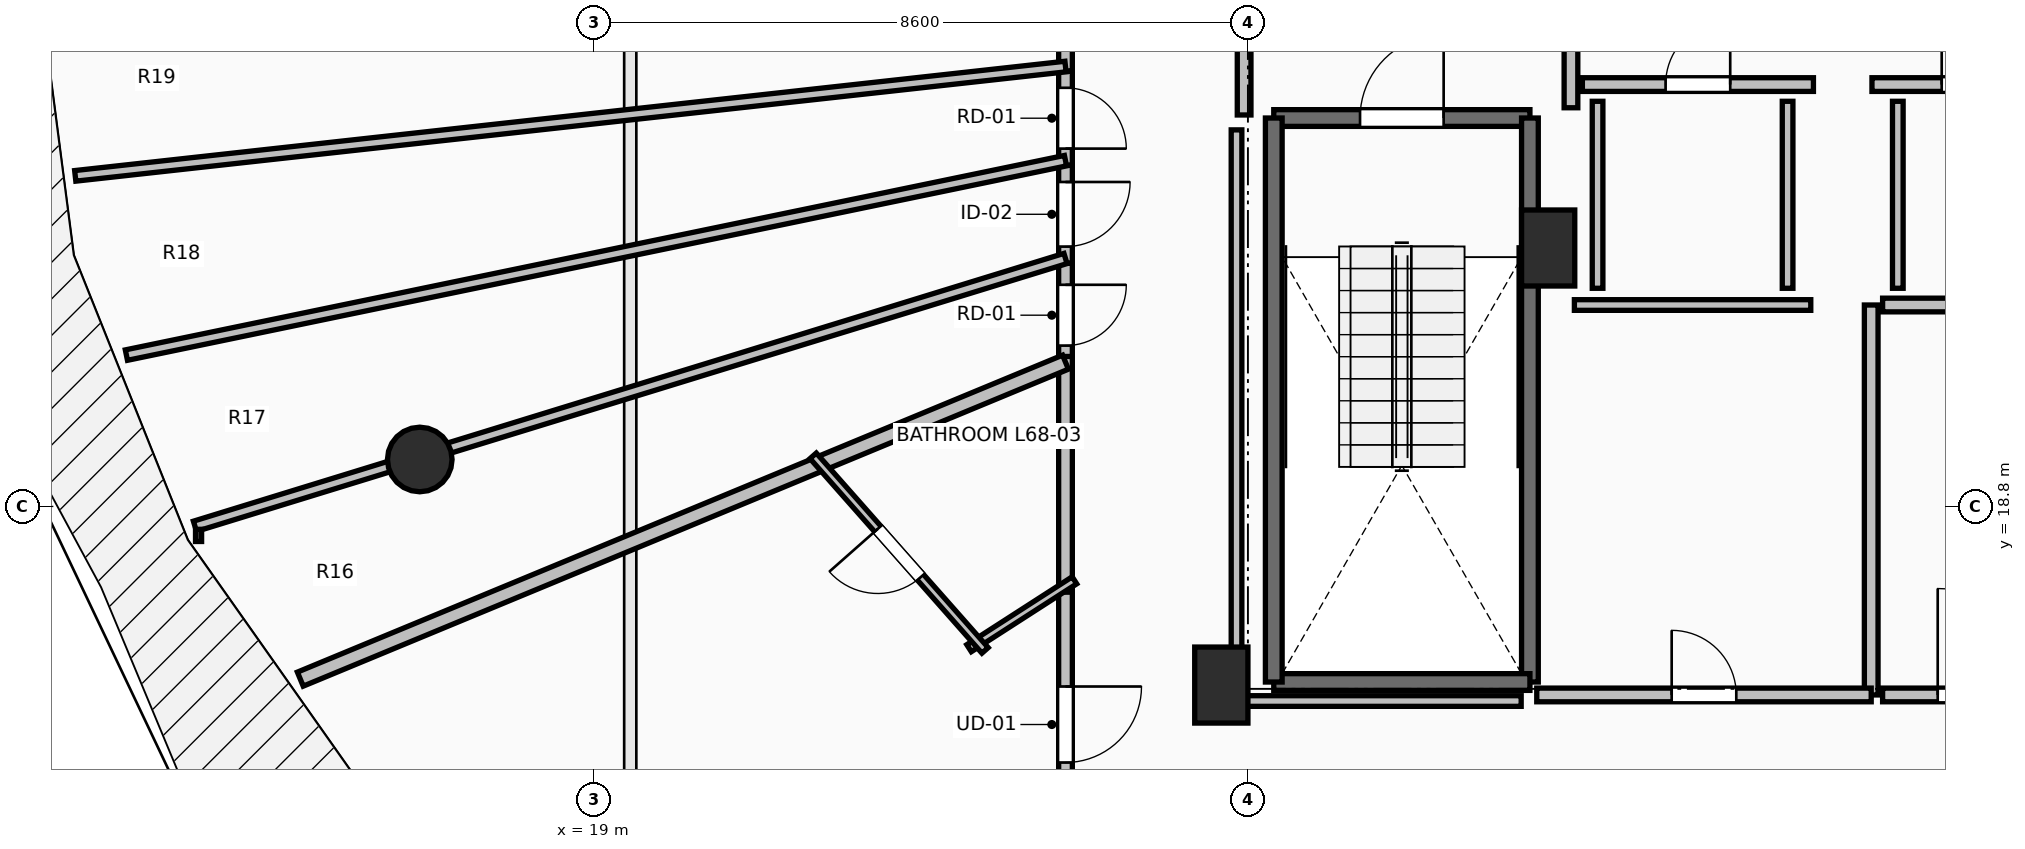
"""IFC4 building model, lengths in metres.
Left out: names, types, materials, properties, quantities, classifications, styles, units other than length and angle.
Written with IfcOpenShell. Run it as: python <this file> out.ifc"""

import sys

from ifc_helpers import new_model, si_unit, direction, frame, frame_2d, origin, origin_2d, place, context, subcontext, project, spatial, rectangle, circle, extrude, element, fill, save


model = new_model("IFC4")
c1 = context("Model", 3, precision=1e-05, world=origin(), true_north=direction((0.0, 1.0)))
c2 = subcontext(c1, "Body", "Model", "MODEL_VIEW")
j1 = project(units=[si_unit("LENGTHUNIT", "METRE"), si_unit("PLANEANGLEUNIT", "RADIAN")], contexts=[c1])
p1 = place(None, origin())
s1 = spatial("IfcSite", under=j1, at=p1, CompositionType="ELEMENT")
p2 = place(p1, origin())
s2 = spatial("IfcBuilding", under=s1, at=p2, CompositionType="ELEMENT")
p3 = place(p2, frame((0.0, 0.0, 252.0)))
s3 = spatial("IfcBuildingStorey", under=s2, at=p3, CompositionType="ELEMENT", Elevation=252.0)
p4 = place(p3, frame((16.705, 19.418, 0.0), z_axis=(0.0, 0.0, 1.0), x_axis=(-0.923879532511, -0.382683432365, 0.0)))
e1 = element("IfcColumn", 1, at=p4, inside=s3, PredefinedType="COLUMN", context=c2, shape_type="SweptSolid", body=[
    extrude(circle(Radius=0.425, at=origin_2d()), origin(), (0.0, 0.0, 1.0), 3.55),
])
for number, where, z_axis, x_axis in (
    (2, (27.25, 16.45, 0.0), (0.0, 0.0, 1.0), (1.0, 0.0, 0.0)),
    (3, (31.55, 22.2, 0.0), (0.0, 0.0, 1.0), (1.0, 0.0, 0.0)),
):
    element("IfcColumn", number, at=place(p3, frame(where, z_axis=z_axis, x_axis=x_axis)), inside=s3, PredefinedType="PILASTER", context=c2, shape_type="SweptSolid", body=[
        extrude(rectangle(XDim=0.7, YDim=1.0, at=origin_2d()), origin(), (0.0, 0.0, 1.0), 3.55),
    ])
p5 = place(p3, frame((27.94, 23.91, 0.0), z_axis=(0.0, 0.0, 1.0), x_axis=(1.0, 0.0, 0.0)))
e4 = element("IfcWall", 4, at=p5, inside=s3, PredefinedType="SOLIDWALL", context=c2, shape_type="SweptSolid", body=[
    extrude(rectangle(XDim=3.37, YDim=0.22, at=frame_2d((1.685, 0.0))), origin(), (0.0, 0.0, 1.0), 3.29),
])
p6 = place(p5, frame((1.135, 0.0, 0.0)))
e5 = element("IfcOpeningElement", 5, at=p6, cuts=e4, PredefinedType="OPENING", context=c2, shape_type="SweptSolid", body=[
    extrude(rectangle(XDim=1.1, YDim=2.15, at=frame_2d((0.55, 1.075))), frame((0.0, 0.125, 0.0), z_axis=(0.0, -1.0, 0.0), x_axis=(1.0, 0.0, 0.0)), (0.0, 0.0, 1.0), 0.25),
])
p7 = place(p3, frame((31.31, 23.91, 0.0), z_axis=(0.0, 0.0, 1.0), x_axis=(0.0, -1.0, 0.0)))
e6 = element("IfcWall", 6, at=p7, inside=s3, PredefinedType="SOLIDWALL", context=c2, shape_type="SweptSolid", body=[
    extrude(rectangle(XDim=7.42, YDim=0.22, at=frame_2d((3.71, 0.0))), origin(), (0.0, 0.0, 1.0), 3.29),
])
p8 = place(p3, frame((31.31, 16.49, 0.0), z_axis=(0.0, 0.0, 1.0), x_axis=(-1.0, 0.0, 0.0)))
e7 = element("IfcWall", 7, at=p8, inside=s3, PredefinedType="SOLIDWALL", context=c2, shape_type="SweptSolid", body=[
    extrude(rectangle(XDim=3.37, YDim=0.22, at=frame_2d((1.685, 0.0))), origin(), (0.0, 0.0, 1.0), 3.29),
])
p9 = place(p3, frame((27.94, 16.49, 0.0), z_axis=(0.0, 0.0, 1.0), x_axis=(0.0, 1.0, 0.0)))
e8 = element("IfcWall", 8, at=p9, inside=s3, PredefinedType="SOLIDWALL", context=c2, shape_type="SweptSolid", body=[
    extrude(rectangle(XDim=7.42, YDim=0.22, at=frame_2d((3.71, 0.0))), origin(), (0.0, 0.0, 1.0), 3.29),
])
p10 = place(p3, frame((31.85, 24.045, 0.0), z_axis=(0.0, 0.0, 1.0), x_axis=(0.0, 1.0, 0.0)))
e9 = element("IfcWall", 9, at=p10, inside=s3, PredefinedType="PARTITIONING", context=c2, shape_type="SweptSolid", body=[
    extrude(rectangle(XDim=3.91, YDim=0.18, at=frame_2d((1.955, 0.0))), origin(), (0.0, 0.0, 1.0), 3.29),
])
p11 = place(p10, frame((1.355, 0.0, 0.0)))
e10 = element("IfcOpeningElement", 10, at=p11, cuts=e9, PredefinedType="OPENING", context=c2, shape_type="SweptSolid", body=[
    extrude(rectangle(XDim=1.2, YDim=2.15, at=frame_2d((0.6, 1.075))), frame((0.0, 0.105, 0.0), z_axis=(0.0, -1.0, 0.0), x_axis=(1.0, 0.0, 0.0)), (0.0, 0.0, 1.0), 0.21),
])
p12 = place(p3, frame((27.55, 28.0, 0.0), z_axis=(0.0, 0.0, 1.0), x_axis=(0.0, -1.0, 0.0)))
e11 = element("IfcWall", 11, at=p12, inside=s3, PredefinedType="PARTITIONING", context=c2, shape_type="SweptSolid", body=[
    extrude(rectangle(XDim=4.05, YDim=0.18, at=frame_2d((2.025, 0.0))), origin(), (0.0, 0.0, 1.0), 3.29),
])
p13 = place(p12, frame((1.425, 0.0, 0.0)))
e12 = element("IfcOpeningElement", 12, at=p13, cuts=e11, PredefinedType="OPENING", context=c2, shape_type="SweptSolid", body=[
    extrude(rectangle(XDim=1.2, YDim=2.15, at=frame_2d((0.6, 1.075))), frame((0.0, 0.105, 0.0), z_axis=(0.0, -1.0, 0.0), x_axis=(1.0, 0.0, 0.0)), (0.0, 0.0, 1.0), 0.21),
])
p14 = place(p3, frame((32.0, 24.35, 0.0), z_axis=(0.0, 0.0, 1.0), x_axis=(1.0, 0.0, 0.0)))
e13 = element("IfcWall", 13, at=p14, inside=s3, PredefinedType="PARTITIONING", context=c2, shape_type="SweptSolid", body=[
    extrude(rectangle(XDim=3.04, YDim=0.18, at=frame_2d((1.52, 0.0))), origin(), (0.0, 0.0, 1.0), 3.29),
])
p15 = place(p14, frame((1.095, 0.0, 0.0)))
e14 = element("IfcOpeningElement", 14, at=p15, cuts=e13, PredefinedType="OPENING", context=c2, shape_type="SweptSolid", body=[
    extrude(rectangle(XDim=0.85, YDim=2.1, at=frame_2d((0.425, 1.05))), frame((0.0, 0.105, 0.0), z_axis=(0.0, -1.0, 0.0), x_axis=(1.0, 0.0, 0.0)), (0.0, 0.0, 1.0), 0.21),
])
p16 = place(p3, frame((35.81, 24.35, 0.0), z_axis=(0.0, 0.0, 1.0), x_axis=(1.0, 0.0, 0.0)))
e15 = element("IfcWall", 15, at=p16, inside=s3, PredefinedType="PARTITIONING", context=c2, shape_type="SweptSolid", body=[
    extrude(rectangle(XDim=2.835, YDim=0.18, at=frame_2d((1.417, 0.0))), origin(), (0.0, 0.0, 1.0), 3.29),
])
p17 = place(p16, frame((0.917, 0.0, 0.0)))
e16 = element("IfcOpeningElement", 16, at=p17, cuts=e15, PredefinedType="OPENING", context=c2, shape_type="SweptSolid", body=[
    extrude(rectangle(XDim=1.0, YDim=2.15, at=frame_2d((0.5, 1.075))), frame((0.0, 0.105, 0.0), z_axis=(0.0, -1.0, 0.0), x_axis=(1.0, 0.0, 0.0)), (0.0, 0.0, 1.0), 0.21),
])
p18 = place(p3, frame((35.8, 16.32, 0.0), z_axis=(0.0, 0.0, 1.0), x_axis=(0.0, 1.0, 0.0)))
e17 = element("IfcWall", 17, at=p18, inside=s3, PredefinedType="PARTITIONING", context=c2, shape_type="SweptSolid", body=[
    extrude(rectangle(XDim=5.13, YDim=0.18, at=frame_2d((2.565, 0.0))), origin(), (0.0, 0.0, 1.0), 3.29),
])
p19 = place(p3, frame((35.005, 21.45, 0.0), z_axis=(0.0, 0.0, 1.0), x_axis=(-1.0, 0.0, 0.0)))
e18 = element("IfcWall", 18, at=p19, inside=s3, PredefinedType="PARTITIONING", context=c2, shape_type="SweptSolid", body=[
    extrude(rectangle(XDim=3.11, YDim=0.14, at=frame_2d((1.555, 0.0))), origin(), (0.0, 0.0, 1.0), 3.29),
])
p20 = place(p3, frame((31.4, 16.32, 0.0), z_axis=(0.0, 0.0, 1.0), x_axis=(1.0, 0.0, 0.0)))
e19 = element("IfcWall", 19, at=p20, inside=s3, PredefinedType="PARTITIONING", context=c2, shape_type="SweptSolid", body=[
    extrude(rectangle(XDim=4.4, YDim=0.18, at=frame_2d((2.2, 0.0))), origin(), (0.0, 0.0, 1.0), 3.29),
])
p21 = place(p20, frame((1.775, 0.0, 0.0)))
e20 = element("IfcOpeningElement", 20, at=p21, cuts=e19, PredefinedType="OPENING", context=c2, shape_type="SweptSolid", body=[
    extrude(rectangle(XDim=0.85, YDim=2.1, at=frame_2d((0.425, 1.05))), frame((0.0, 0.105, 0.0), z_axis=(0.0, -1.0, 0.0), x_axis=(1.0, 0.0, 0.0)), (0.0, 0.0, 1.0), 0.21),
])
p22 = place(p3, frame((38.8, 21.45, 0.0), z_axis=(0.0, 0.0, 1.0), x_axis=(-1.0, 0.0, 0.0)))
e21 = element("IfcWall", 21, at=p22, inside=s3, PredefinedType="PARTITIONING", context=c2, shape_type="SweptSolid", body=[
    extrude(rectangle(XDim=2.85, YDim=0.18, at=frame_2d((1.425, 0.0))), origin(), (0.0, 0.0, 1.0), 3.29),
])
p23 = place(p3, frame((35.95, 16.32, 0.0), z_axis=(0.0, 0.0, 1.0), x_axis=(1.0, 0.0, 0.0)))
e22 = element("IfcWall", 22, at=p23, inside=s3, PredefinedType="PARTITIONING", context=c2, shape_type="SweptSolid", body=[
    extrude(rectangle(XDim=2.85, YDim=0.18, at=frame_2d((1.425, 0.0))), origin(), (0.0, 0.0, 1.0), 3.29),
])
p24 = place(p23, frame((0.725, 0.0, 0.0)))
e23 = element("IfcOpeningElement", 23, at=p24, cuts=e22, PredefinedType="OPENING", context=c2, shape_type="SweptSolid", body=[
    extrude(rectangle(XDim=1.4, YDim=2.2, at=frame_2d((0.7, 1.1))), frame((0.0, 0.105, 0.0), z_axis=(0.0, -1.0, 0.0), x_axis=(1.0, 0.0, 0.0)), (0.0, 0.0, 1.0), 0.21),
])
p25 = place(p3, frame((25.2, 25.739, 0.0), z_axis=(0.0, 0.0, 1.0), x_axis=(0.0, -1.0, 0.0)))
e24 = element("IfcWall", 24, at=p25, inside=s3, PredefinedType="PARTITIONING", context=c2, shape_type="SweptSolid", body=[
    extrude(rectangle(XDim=1.212, YDim=0.18, at=frame_2d((0.606, 0.0))), origin(), (0.0, 0.0, 1.0), 3.29),
])
p26 = place(p3, frame((25.2, 24.527, 0.0), z_axis=(0.0, 0.0, 1.0), x_axis=(0.0, -1.0, 0.0)))
e25 = element("IfcWall", 25, at=p26, inside=s3, PredefinedType="PARTITIONING", context=c2, shape_type="SweptSolid", body=[
    extrude(rectangle(XDim=1.239, YDim=0.18, at=frame_2d((0.62, 0.0))), origin(), (0.0, 0.0, 1.0), 3.29),
])
p27 = place(p26, frame((0.219, 0.0, 0.0)))
e26 = element("IfcOpeningElement", 26, at=p27, cuts=e25, PredefinedType="OPENING", context=c2, shape_type="SweptSolid", body=[
    extrude(rectangle(XDim=0.8, YDim=2.05, at=frame_2d((0.4, 1.025))), frame((0.0, 0.105, 0.0), z_axis=(0.0, -1.0, 0.0), x_axis=(1.0, 0.0, 0.0)), (0.0, 0.0, 1.0), 0.21),
])
p28 = place(p3, frame((25.2, 23.288, 0.0), z_axis=(0.0, 0.0, 1.0), x_axis=(0.0, -1.0, 0.0)))
e27 = element("IfcWall", 27, at=p28, inside=s3, PredefinedType="PARTITIONING", context=c2, shape_type="SweptSolid", body=[
    extrude(rectangle(XDim=1.289, YDim=0.18, at=frame_2d((0.645, 0.0))), origin(), (0.0, 0.0, 1.0), 3.29),
])
p29 = place(p28, frame((0.219, 0.0, 0.0)))
e28 = element("IfcOpeningElement", 28, at=p29, cuts=e27, PredefinedType="OPENING", context=c2, shape_type="SweptSolid", body=[
    extrude(rectangle(XDim=0.85, YDim=2.1, at=frame_2d((0.425, 1.05))), frame((0.0, 0.105, 0.0), z_axis=(0.0, -1.0, 0.0), x_axis=(1.0, 0.0, 0.0)), (0.0, 0.0, 1.0), 0.21),
])
p30 = place(p3, frame((25.2, 21.999, 0.0), z_axis=(0.0, 0.0, 1.0), x_axis=(0.0, -1.0, 0.0)))
e29 = element("IfcWall", 29, at=p30, inside=s3, PredefinedType="PARTITIONING", context=c2, shape_type="SweptSolid", body=[
    extrude(rectangle(XDim=1.366, YDim=0.18, at=frame_2d((0.683, 0.0))), origin(), (0.0, 0.0, 1.0), 3.29),
])
p31 = place(p30, frame((0.283, 0.0, 0.0)))
e30 = element("IfcOpeningElement", 30, at=p31, cuts=e29, PredefinedType="OPENING", context=c2, shape_type="SweptSolid", body=[
    extrude(rectangle(XDim=0.8, YDim=2.05, at=frame_2d((0.4, 1.025))), frame((0.0, 0.105, 0.0), z_axis=(0.0, -1.0, 0.0), x_axis=(1.0, 0.0, 0.0)), (0.0, 0.0, 1.0), 0.21),
])
p32 = place(p3, frame((25.2, 17.812, 0.0), z_axis=(0.0, 0.0, 1.0), x_axis=(0.0, -1.0, 0.0)))
e31 = element("IfcWall", 31, at=p32, inside=s3, PredefinedType="PARTITIONING", context=c2, shape_type="SweptSolid", body=[
    extrude(rectangle(XDim=3.762, YDim=0.18, at=frame_2d((1.881, 0.0))), origin(), (0.0, 0.0, 1.0), 2.482),
])
p33 = place(p32, frame((1.381, 0.0, 0.0)))
e32 = element("IfcOpeningElement", 32, at=p33, cuts=e31, PredefinedType="OPENING", context=c2, shape_type="SweptSolid", body=[
    extrude(rectangle(XDim=1.0, YDim=2.15, at=frame_2d((0.5, 1.075))), frame((0.0, 0.105, 0.0), z_axis=(0.0, -1.0, 0.0), x_axis=(1.0, 0.0, 0.0)), (0.0, 0.0, 1.0), 0.21),
])
p34 = place(p3, frame((25.2, 20.773, 0.0), z_axis=(0.0, 0.0, 1.0), x_axis=(0.0, -1.0, 0.0)))
e33 = element("IfcWall", 33, at=p34, inside=s3, PredefinedType="PARTITIONING", context=c2, shape_type="SweptSolid", body=[
    extrude(rectangle(XDim=3.101, YDim=0.18, at=frame_2d((1.55, 0.0))), origin(), (0.0, 0.0, 1.0), 3.29),
])
p35 = place(p3, frame((12.172, 23.149, 0.0), z_axis=(0.0, 0.0, 1.0), x_axis=(0.993963433103, 0.109711866515, 0.0)))
e34 = element("IfcWall", 34, at=p35, inside=s3, PredefinedType="PARTITIONING", context=c2, shape_type="SweptSolid", body=[
    extrude(rectangle(XDim=13.107, YDim=0.14, at=frame_2d((6.553, 0.0))), origin(), (0.0, 0.0, 1.0), 2.874),
])
p36 = place(p3, frame((12.845, 20.791, 0.0), z_axis=(0.0, 0.0, 1.0), x_axis=(0.97923049011, 0.202750208975, 0.0)))
e35 = element("IfcWall", 35, at=p36, inside=s3, PredefinedType="PARTITIONING", context=c2, shape_type="SweptSolid", body=[
    extrude(rectangle(XDim=12.617, YDim=0.14, at=frame_2d((6.309, 0.0))), origin(), (0.0, 0.0, 1.0), 2.874),
])
p37 = place(p3, frame((13.747, 18.539, 0.0), z_axis=(0.0, 0.0, 1.0), x_axis=(0.955802794564, 0.294008533725, 0.0)))
e36 = element("IfcWall", 36, at=p37, inside=s3, PredefinedType="PARTITIONING", context=c2, shape_type="SweptSolid", body=[
    extrude(rectangle(XDim=11.982, YDim=0.14, at=frame_2d((5.991, 0.0))), origin(), (0.0, 0.0, 1.0), 2.482),
])
p38 = place(p3, frame((15.133, 16.528, 0.0), z_axis=(0.0, 0.0, 1.0), x_axis=(0.923877013663, 0.382689513347, 0.0)))
e37 = element("IfcWall", 37, at=p38, inside=s3, PredefinedType="PARTITIONING", context=c2, shape_type="SweptSolid", body=[
    extrude(rectangle(XDim=10.896, YDim=0.2, at=frame_2d((5.448, 0.0))), origin(), (0.0, 0.0, 1.0), 2.482),
])
p39 = place(p3, frame((25.318, 17.828, 0.0), z_axis=(0.0, 0.0, 1.0), x_axis=(-0.840783734709, -0.541371140207, 0.0)))
e38 = element("IfcWall", 38, at=p39, inside=s3, PredefinedType="PARTITIONING", context=c2, shape_type="SweptSolid", body=[
    extrude(rectangle(XDim=1.649, YDim=0.11, at=frame_2d((0.824, 0.0))), origin(), (0.0, 0.0, 1.0), 2.482),
])
p40 = place(p3, frame((24.142, 16.906, 0.0), z_axis=(0.0, 0.0, 1.0), x_axis=(-0.662044708061, 0.749464345068, 0.0)))
e39 = element("IfcWall", 39, at=p40, inside=s3, PredefinedType="PARTITIONING", context=c2, shape_type="SweptSolid", body=[
    extrude(rectangle(XDim=3.416, YDim=0.11, at=frame_2d((1.708, 0.0))), origin(), (0.0, 0.0, 1.0), 2.482),
])
p41 = place(p40, frame((1.283, 0.0, 0.0)))
e40 = element("IfcOpeningElement", 40, at=p41, cuts=e39, PredefinedType="OPENING", context=c2, shape_type="SweptSolid", body=[
    extrude(rectangle(XDim=0.85, YDim=2.1, at=frame_2d((0.425, 1.05))), frame((0.0, 0.07, 0.0), z_axis=(0.0, -1.0, 0.0), x_axis=(1.0, 0.0, 0.0)), (0.0, 0.0, 1.0), 0.14),
])
for number, where, z_axis, x_axis in (
    (41, (32.2, 24.13, 0.0), (0.0, 0.0, 1.0), (0.0, -1.0, 0.0)),
    (42, (34.7, 21.67, 0.0), (0.0, 0.0, 1.0), (0.0, 1.0, 0.0)),
    (43, (36.15, 24.13, 0.0), (0.0, 0.0, 1.0), (0.0, -1.0, 0.0)),
):
    element("IfcWall", number, at=place(p3, frame(where, z_axis=z_axis, x_axis=x_axis)), inside=s3, PredefinedType="PARTITIONING", context=c2, shape_type="SweptSolid", body=[
        extrude(rectangle(XDim=2.46, YDim=0.14, at=frame_2d((1.23, 0.0))), origin(), (0.0, 0.0, 1.0), 2.482),
    ])
p42 = place(p3, frame((27.45, 23.754, 0.0), z_axis=(0.0, 0.0, 1.0), x_axis=(0.0, -1.0, 0.0)))
e44 = element("IfcWall", 44, at=p42, inside=s3, PredefinedType="PARTITIONING", context=c2, shape_type="SweptSolid", body=[
    extrude(rectangle(XDim=7.514, YDim=0.14, at=frame_2d((3.757, 0.0))), origin(), (0.0, 0.0, 1.0), 2.482),
])
p43 = place(p3, frame((27.45, 16.24, 0.0), z_axis=(0.0, 0.0, 1.0), x_axis=(1.0, 0.0, 0.0)))
e45 = element("IfcWall", 45, at=p43, inside=s3, PredefinedType="PARTITIONING", context=c2, shape_type="SweptSolid", body=[
    extrude(rectangle(XDim=3.745, YDim=0.14, at=frame_2d((1.873, 0.0))), origin(), (0.0, 0.0, 1.0), 2.482),
])
p44 = place(p6, origin())
e46 = element("IfcDoor", 46, at=p44, inside=s3, OperationType="SINGLE_SWING_RIGHT", PredefinedType="DOOR", context=c2, shape_type="SweptSolid", body=[
    extrude(rectangle(XDim=1.1, YDim=2.15, at=frame_2d((0.55, 1.075))), frame((0.0, 0.025, 0.0), z_axis=(0.0, -1.0, 0.0), x_axis=(1.0, 0.0, 0.0)), (0.0, 0.0, 1.0), 0.05),
])
fill(e5, e46)
p45 = place(p15, origin())
e47 = element("IfcDoor", 47, at=p45, inside=s3, OperationType="SINGLE_SWING_RIGHT", PredefinedType="DOOR", context=c2, shape_type="SweptSolid", body=[
    extrude(rectangle(XDim=0.85, YDim=2.1, at=frame_2d((0.425, 1.05))), frame((0.0, 0.025, 0.0), z_axis=(0.0, -1.0, 0.0), x_axis=(1.0, 0.0, 0.0)), (0.0, 0.0, 1.0), 0.05),
])
fill(e14, e47)
p46 = place(p17, origin())
e48 = element("IfcDoor", 48, at=p46, inside=s3, OperationType="SINGLE_SWING_LEFT", PredefinedType="DOOR", context=c2, shape_type="SweptSolid", body=[
    extrude(rectangle(XDim=1.0, YDim=2.15, at=frame_2d((0.5, 1.075))), frame((0.0, 0.025, 0.0), z_axis=(0.0, -1.0, 0.0), x_axis=(1.0, 0.0, 0.0)), (0.0, 0.0, 1.0), 0.05),
])
fill(e16, e48)
p47 = place(p21, origin())
e49 = element("IfcDoor", 49, at=p47, inside=s3, OperationType="SINGLE_SWING_LEFT", PredefinedType="DOOR", context=c2, shape_type="SweptSolid", body=[
    extrude(rectangle(XDim=0.85, YDim=2.1, at=frame_2d((0.425, 1.05))), frame((0.0, 0.025, 0.0), z_axis=(0.0, -1.0, 0.0), x_axis=(1.0, 0.0, 0.0)), (0.0, 0.0, 1.0), 0.05),
])
fill(e20, e49)
p48 = place(p24, origin())
e50 = element("IfcDoor", 50, at=p48, inside=s3, OperationType="DOUBLE_SWING_LEFT", PredefinedType="DOOR", context=c2, shape_type="SweptSolid", body=[
    extrude(rectangle(XDim=1.4, YDim=2.2, at=frame_2d((0.7, 1.1))), frame((0.0, 0.025, 0.0), z_axis=(0.0, -1.0, 0.0), x_axis=(1.0, 0.0, 0.0)), (0.0, 0.0, 1.0), 0.05),
])
fill(e23, e50)
p49 = place(p33, origin())
e51 = element("IfcDoor", 51, at=p49, inside=s3, OperationType="SINGLE_SWING_LEFT", PredefinedType="DOOR", context=c2, shape_type="SweptSolid", body=[
    extrude(rectangle(XDim=1.0, YDim=2.15, at=frame_2d((0.5, 1.075))), frame((0.0, 0.025, 0.0), z_axis=(0.0, -1.0, 0.0), x_axis=(1.0, 0.0, 0.0)), (0.0, 0.0, 1.0), 0.05),
])
fill(e32, e51)
p50 = place(p41, origin())
e52 = element("IfcDoor", 52, at=p50, inside=s3, OperationType="SINGLE_SWING_RIGHT", PredefinedType="DOOR", context=c2, shape_type="SweptSolid", body=[
    extrude(rectangle(XDim=0.85, YDim=2.1, at=frame_2d((0.425, 1.05))), frame((0.0, 0.025, 0.0), z_axis=(0.0, -1.0, 0.0), x_axis=(1.0, 0.0, 0.0)), (0.0, 0.0, 1.0), 0.05),
])
fill(e40, e52)
p51 = place(p27, origin())
e53 = element("IfcDoor", 53, at=p51, inside=s3, OperationType="SINGLE_SWING_RIGHT", PredefinedType="DOOR", context=c2, shape_type="SweptSolid", body=[
    extrude(rectangle(XDim=0.8, YDim=2.05, at=frame_2d((0.4, 1.025))), frame((0.0, 0.025, 0.0), z_axis=(0.0, -1.0, 0.0), x_axis=(1.0, 0.0, 0.0)), (0.0, 0.0, 1.0), 0.05),
])
fill(e26, e53)
p52 = place(p29, origin())
e54 = element("IfcDoor", 54, at=p52, inside=s3, OperationType="SINGLE_SWING_LEFT", PredefinedType="DOOR", context=c2, shape_type="SweptSolid", body=[
    extrude(rectangle(XDim=0.85, YDim=2.1, at=frame_2d((0.425, 1.05))), frame((0.0, 0.025, 0.0), z_axis=(0.0, -1.0, 0.0), x_axis=(1.0, 0.0, 0.0)), (0.0, 0.0, 1.0), 0.05),
])
fill(e28, e54)
p53 = place(p31, origin())
e55 = element("IfcDoor", 55, at=p53, inside=s3, OperationType="SINGLE_SWING_LEFT", PredefinedType="DOOR", context=c2, shape_type="SweptSolid", body=[
    extrude(rectangle(XDim=0.8, YDim=2.05, at=frame_2d((0.4, 1.025))), frame((0.0, 0.025, 0.0), z_axis=(0.0, -1.0, 0.0), x_axis=(1.0, 0.0, 0.0)), (0.0, 0.0, 1.0), 0.05),
])
fill(e30, e55)
save(model, sys.argv[1])
